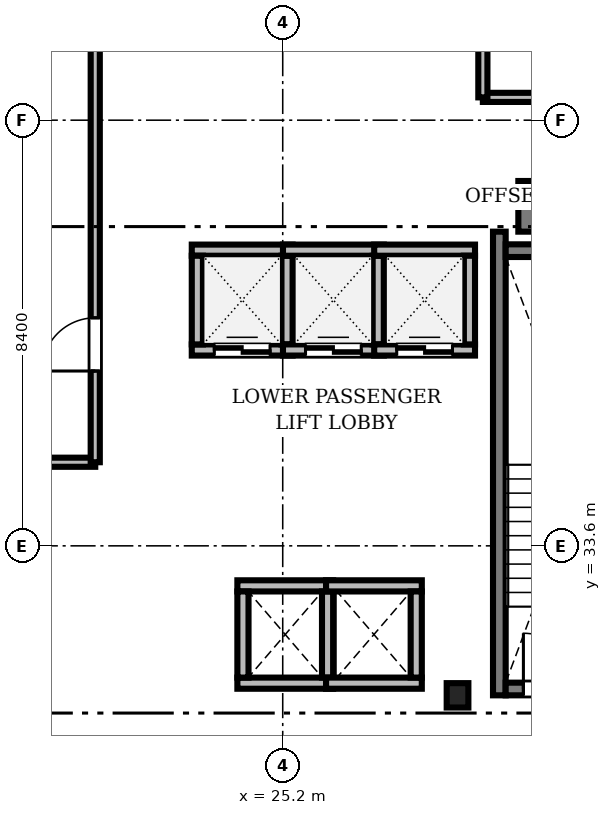
"""IFC4 building model, lengths in metres.
Left out: names, types, materials, properties, quantities, classifications, styles, units other than length and angle.
Written with IfcOpenShell. Run it as: python <this file> out.ifc"""

import sys

from ifc_helpers import new_model, si_unit, direction, frame, frame_2d, origin, origin_2d, place, context, subcontext, project, spatial, rectangle, i_section, extrude, source, transform, mapped, element, fill, save


model = new_model("IFC4")
c1 = context("Model", 3, precision=1e-05, world=origin(), true_north=direction((0.0, 1.0)))
c2 = subcontext(c1, "Body", "Model", "MODEL_VIEW")
j1 = project(units=[si_unit("LENGTHUNIT", "METRE"), si_unit("PLANEANGLEUNIT", "RADIAN")], contexts=[c1])
p1 = place(None, origin())
s1 = spatial("IfcSite", under=j1, at=p1, CompositionType="ELEMENT")
p2 = place(p1, origin())
s2 = spatial("IfcBuilding", under=s1, at=p2, CompositionType="ELEMENT")
p3 = place(p2, frame((0.0, 0.0, 42.2)))
s3 = spatial("IfcBuildingStorey", under=s2, at=p3, CompositionType="ELEMENT", Elevation=42.2)
m1 = source(origin(), c2, "Body", "SweptSolid", [
    extrude(rectangle(XDim=17.52, YDim=1.0, at=frame_2d((8.76, 0.0))), origin(), (0.0, 0.0, 1.0), 3.41),
])
p4 = place(p3, frame((29.85, 40.3, 0.0), z_axis=(0.0, 0.0, 1.0), x_axis=(1.0, 0.0, 0.0)))
e1 = element("IfcWall", 1, at=p4, inside=s3, PredefinedType="SHEAR", context=c2, shape_type="MappedRepresentation", body=[
    mapped(m1, transform((0.0, 0.0, 0.0), scale=1.0)),
])
m2 = source(origin(), c2, "Body", "SweptSolid", [
    extrude(i_section(OverallWidth=0.428, OverallDepth=0.481, WebThickness=0.04, FlangeThickness=0.063, FilletRadius=0.015, at=origin_2d()), origin(), (0.0, 0.0, 1.0), 3.41),
])
p5 = place(p3, frame((28.65, 30.65, 0.0), z_axis=(0.0, 0.0, 1.0), x_axis=(1.0, 0.0, 0.0)))
e2 = element("IfcColumn", 2, at=p5, inside=s3, PredefinedType="COLUMN", context=c2, shape_type="MappedRepresentation", body=[
    mapped(m2, transform((0.0, 0.0, 0.0), scale=1.0)),
])
m3 = source(origin(), c2, "Body", "SweptSolid", [
    extrude(rectangle(XDim=9.15, YDim=0.25, at=frame_2d((4.575, 0.0))), origin(), (0.0, 0.0, 1.0), 3.45),
])
p6 = place(p3, frame((29.475, 30.65, 0.0), z_axis=(0.0, 0.0, 1.0), x_axis=(0.0, 1.0, 0.0)))
e3 = element("IfcWall", 3, at=p6, inside=s3, PredefinedType="SOLIDWALL", context=c2, shape_type="MappedRepresentation", body=[
    mapped(m3, transform((0.0, 0.0, 0.0), scale=1.0)),
])
m4 = source(origin(), c2, "Body", "SweptSolid", [
    extrude(rectangle(XDim=3.15, YDim=0.25, at=frame_2d((1.575, 0.0))), origin(), (0.0, 0.0, 1.0), 3.45),
])
p7 = place(p3, frame((29.6, 39.425, 0.0), z_axis=(0.0, 0.0, 1.0), x_axis=(1.0, 0.0, 0.0)))
e4 = element("IfcWall", 4, at=p7, inside=s3, PredefinedType="SOLIDWALL", context=c2, shape_type="MappedRepresentation", body=[
    mapped(m4, transform((0.0, 0.0, 0.0), scale=1.0)),
])
p8 = place(p3, frame((29.6, 30.775, 0.0), z_axis=(0.0, 0.0, 1.0), x_axis=(1.0, 0.0, 0.0)))
e5 = element("IfcWall", 5, at=p8, inside=s3, PredefinedType="SOLIDWALL", context=c2, shape_type="MappedRepresentation", body=[
    mapped(m4, transform((0.0, 0.0, 0.0), scale=1.0)),
])
m5 = source(origin(), c2, "Body", "SweptSolid", [
    extrude(rectangle(XDim=1.1, YDim=2.2, at=frame_2d((0.55, 1.1))), frame((0.0, 0.135, 0.0), z_axis=(0.0, -1.0, 0.0), x_axis=(1.0, 0.0, 0.0)), (0.0, 0.0, 1.0), 0.27),
])
p9 = place(p8, frame((0.35, 0.0, 0.0)))
e6 = element("IfcOpeningElement", 6, at=p9, cuts=e5, PredefinedType="OPENING", context=c2, shape_type="MappedRepresentation", body=[
    mapped(m5, transform((0.0, 0.0, 0.0), scale=1.0)),
])
m6 = source(origin(), c2, "Body", "SweptSolid", [
    extrude(rectangle(XDim=1.99, YDim=0.22, at=frame_2d((0.995, 0.0))), origin(), (0.0, 0.0, 1.0), 3.41),
])
p10 = place(p3, frame((23.405, 37.465, 0.0), z_axis=(0.0, 0.0, 1.0), x_axis=(1.0, 0.0, 0.0)))
e7 = element("IfcWall", 7, at=p10, inside=s3, PredefinedType="SOLIDWALL", context=c2, shape_type="MappedRepresentation", body=[
    mapped(m6, transform((0.0, 0.0, 0.0), scale=1.0)),
])
m7 = source(origin(), c2, "Body", "SweptSolid", [
    extrude(rectangle(XDim=1.1, YDim=2.2, at=frame_2d((0.55, 1.1))), frame((0.0, 0.12, 0.0), z_axis=(0.0, -1.0, 0.0), x_axis=(1.0, 0.0, 0.0)), (0.0, 0.0, 1.0), 0.24),
])
p11 = place(p10, frame((0.445, 0.0, 0.0)))
e8 = element("IfcOpeningElement", 8, at=p11, cuts=e7, PredefinedType="OPENING", context=c2, shape_type="MappedRepresentation", body=[
    mapped(m7, transform((0.0, 0.0, 0.0), scale=1.0)),
])
p12 = place(p3, frame((23.405, 39.435, 0.0), z_axis=(0.0, 0.0, 1.0), x_axis=(1.0, 0.0, 0.0)))
e9 = element("IfcWall", 9, at=p12, inside=s3, PredefinedType="SOLIDWALL", context=c2, shape_type="MappedRepresentation", body=[
    mapped(m6, transform((0.0, 0.0, 0.0), scale=1.0)),
])
m8 = source(origin(), c2, "Body", "SweptSolid", [
    extrude(rectangle(XDim=1.75, YDim=0.22, at=frame_2d((0.875, 0.0))), origin(), (0.0, 0.0, 1.0), 3.41),
])
for number, where, z_axis, x_axis in (
    (10, (23.515, 37.575, 0.0), (0.0, 0.0, 1.0), (0.0, 1.0, 0.0)),
    (11, (25.285, 37.575, 0.0), (0.0, 0.0, 1.0), (0.0, 1.0, 0.0)),
):
    element("IfcWall", number, at=place(p3, frame(where, z_axis=z_axis, x_axis=x_axis)), inside=s3, PredefinedType="SOLIDWALL", context=c2, shape_type="MappedRepresentation", body=[
        mapped(m8, transform((0.0, 0.0, 0.0), scale=1.0)),
    ])
p13 = place(p3, frame((25.205, 37.465, 0.0), z_axis=(0.0, 0.0, 1.0), x_axis=(1.0, 0.0, 0.0)))
e12 = element("IfcWall", 12, at=p13, inside=s3, PredefinedType="SOLIDWALL", context=c2, shape_type="MappedRepresentation", body=[
    mapped(m6, transform((0.0, 0.0, 0.0), scale=1.0)),
])
p14 = place(p13, frame((0.445, 0.0, 0.0)))
e13 = element("IfcOpeningElement", 13, at=p14, cuts=e12, PredefinedType="OPENING", context=c2, shape_type="MappedRepresentation", body=[
    mapped(m7, transform((0.0, 0.0, 0.0), scale=1.0)),
])
p15 = place(p3, frame((25.205, 39.435, 0.0), z_axis=(0.0, 0.0, 1.0), x_axis=(1.0, 0.0, 0.0)))
e14 = element("IfcWall", 14, at=p15, inside=s3, PredefinedType="SOLIDWALL", context=c2, shape_type="MappedRepresentation", body=[
    mapped(m6, transform((0.0, 0.0, 0.0), scale=1.0)),
])
p16 = place(p3, frame((27.085, 37.575, 0.0), z_axis=(0.0, 0.0, 1.0), x_axis=(0.0, 1.0, 0.0)))
e15 = element("IfcWall", 15, at=p16, inside=s3, PredefinedType="SOLIDWALL", context=c2, shape_type="MappedRepresentation", body=[
    mapped(m8, transform((0.0, 0.0, 0.0), scale=1.0)),
])
m9 = source(origin(), c2, "Body", "SweptSolid", [
    extrude(rectangle(XDim=1.99, YDim=0.22, at=frame_2d((0.995, 0.0))), origin(), (0.0, 0.0, 1.0), 3.41),
])
p17 = place(p3, frame((27.005, 37.465, 0.0), z_axis=(0.0, 0.0, 1.0), x_axis=(1.0, 0.0, 0.0)))
e16 = element("IfcWall", 16, at=p17, inside=s3, PredefinedType="SOLIDWALL", context=c2, shape_type="MappedRepresentation", body=[
    mapped(m9, transform((0.0, 0.0, 0.0), scale=1.0)),
])
p18 = place(p17, frame((0.445, 0.0, 0.0)))
e17 = element("IfcOpeningElement", 17, at=p18, cuts=e16, PredefinedType="OPENING", context=c2, shape_type="MappedRepresentation", body=[
    mapped(m7, transform((0.0, 0.0, 0.0), scale=1.0)),
])
p19 = place(p3, frame((27.005, 39.435, 0.0), z_axis=(0.0, 0.0, 1.0), x_axis=(1.0, 0.0, 0.0)))
e18 = element("IfcWall", 18, at=p19, inside=s3, PredefinedType="SOLIDWALL", context=c2, shape_type="MappedRepresentation", body=[
    mapped(m9, transform((0.0, 0.0, 0.0), scale=1.0)),
])
p20 = place(p3, frame((28.885, 37.575, 0.0), z_axis=(0.0, 0.0, 1.0), x_axis=(0.0, 1.0, 0.0)))
e19 = element("IfcWall", 19, at=p20, inside=s3, PredefinedType="SOLIDWALL", context=c2, shape_type="MappedRepresentation", body=[
    mapped(m8, transform((0.0, 0.0, 0.0), scale=1.0)),
])
m10 = source(origin(), c2, "Body", "SweptSolid", [
    extrude(rectangle(XDim=1.89, YDim=0.22, at=frame_2d((0.945, 0.0))), origin(), (0.0, 0.0, 1.0), 3.41),
])
for number, where, z_axis, x_axis in (
    (20, (24.305, 30.89, 0.0), (0.0, 0.0, 1.0), (1.0, 0.0, 0.0)),
    (21, (24.305, 32.81, 0.0), (0.0, 0.0, 1.0), (1.0, 0.0, 0.0)),
):
    element("IfcWall", number, at=place(p3, frame(where, z_axis=z_axis, x_axis=x_axis)), inside=s3, PredefinedType="SOLIDWALL", context=c2, shape_type="MappedRepresentation", body=[
        mapped(m10, transform((0.0, 0.0, 0.0), scale=1.0)),
    ])
m11 = source(origin(), c2, "Body", "SweptSolid", [
    extrude(rectangle(XDim=1.7, YDim=0.22, at=frame_2d((0.85, 0.0))), origin(), (0.0, 0.0, 1.0), 3.41),
])
for number, where, z_axis, x_axis in (
    (22, (24.415, 31.0, 0.0), (0.0, 0.0, 1.0), (0.0, 1.0, 0.0)),
    (23, (26.085, 31.0, 0.0), (0.0, 0.0, 1.0), (0.0, 1.0, 0.0)),
):
    element("IfcWall", number, at=place(p3, frame(where, z_axis=z_axis, x_axis=x_axis)), inside=s3, PredefinedType="SOLIDWALL", context=c2, shape_type="MappedRepresentation", body=[
        mapped(m11, transform((0.0, 0.0, 0.0), scale=1.0)),
    ])
for number, where, z_axis, x_axis in (
    (24, (26.055, 30.89, 0.0), (0.0, 0.0, 1.0), (1.0, 0.0, 0.0)),
    (25, (26.055, 32.81, 0.0), (0.0, 0.0, 1.0), (1.0, 0.0, 0.0)),
):
    element("IfcWall", number, at=place(p3, frame(where, z_axis=z_axis, x_axis=x_axis)), inside=s3, PredefinedType="SOLIDWALL", context=c2, shape_type="MappedRepresentation", body=[
        mapped(m10, transform((0.0, 0.0, 0.0), scale=1.0)),
    ])
p21 = place(p3, frame((27.835, 31.0, 0.0), z_axis=(0.0, 0.0, 1.0), x_axis=(0.0, 1.0, 0.0)))
e26 = element("IfcWall", 26, at=p21, inside=s3, PredefinedType="SOLIDWALL", context=c2, shape_type="MappedRepresentation", body=[
    mapped(m11, transform((0.0, 0.0, 0.0), scale=1.0)),
])
m12 = source(origin(), c2, "Body", "SweptSolid", [
    extrude(rectangle(XDim=19.428, YDim=0.18, at=frame_2d((9.714, 0.0))), origin(), (0.0, 0.0, 1.0), 2.652),
])
p22 = place(p3, frame((29.15, 42.45, 0.0), z_axis=(0.0, 0.0, 1.0), x_axis=(1.0, 0.0, 0.0)))
e27 = element("IfcWall", 27, at=p22, inside=s3, PredefinedType="PARTITIONING", context=c2, shape_type="MappedRepresentation", body=[
    mapped(m12, transform((0.0, 0.0, 0.0), scale=1.0)),
])
m13 = source(origin(), c2, "Body", "SweptSolid", [
    extrude(rectangle(XDim=1.05, YDim=2.2, at=frame_2d((0.525, 1.1))), frame((0.0, 0.1, 0.0), z_axis=(0.0, -1.0, 0.0), x_axis=(1.0, 0.0, 0.0)), (0.0, 0.0, 1.0), 0.2),
])
p23 = place(p22, frame((4.5, 0.0, 0.0)))
e28 = element("IfcOpeningElement", 28, at=p23, cuts=e27, PredefinedType="OPENING", context=c2, shape_type="MappedRepresentation", body=[
    mapped(m13, transform((0.0, 0.0, 0.0), scale=1.0)),
])
m14 = source(origin(), c2, "Body", "SweptSolid", [
    extrude(rectangle(XDim=19.078, YDim=0.18, at=frame_2d((9.539, 0.0))), origin(), (0.0, 0.0, 1.0), 2.652),
])
p24 = place(p3, frame((2.422, 35.25, 0.0), z_axis=(0.0, 0.0, 1.0), x_axis=(1.0, 0.0, 0.0)))
e29 = element("IfcWall", 29, at=p24, inside=s3, PredefinedType="PARTITIONING", context=c2, shape_type="MappedRepresentation", body=[
    mapped(m14, transform((0.0, 0.0, 0.0), scale=1.0)),
])
p25 = place(p24, frame((13.129, 0.0, 0.0)))
e30 = element("IfcOpeningElement", 30, at=p25, cuts=e29, PredefinedType="OPENING", context=c2, shape_type="MappedRepresentation", body=[
    mapped(m13, transform((0.0, 0.0, 0.0), scale=1.0)),
])
m15 = source(origin(), c2, "Body", "SweptSolid", [
    extrude(rectangle(XDim=13.028, YDim=0.18, at=frame_2d((6.514, 0.0))), origin(), (0.0, 0.0, 1.0), 2.652),
])
p26 = place(p3, frame((21.5, 35.25, 0.0), z_axis=(0.0, 0.0, 1.0), x_axis=(0.0, 1.0, 0.0)))
e31 = element("IfcWall", 31, at=p26, inside=s3, PredefinedType="PARTITIONING", context=c2, shape_type="MappedRepresentation", body=[
    mapped(m15, transform((0.0, 0.0, 0.0), scale=1.0)),
])
p27 = place(p26, frame((1.8, 0.0, 0.0)))
e32 = element("IfcOpeningElement", 32, at=p27, cuts=e31, PredefinedType="OPENING", context=c2, shape_type="MappedRepresentation", body=[
    mapped(m13, transform((0.0, 0.0, 0.0), scale=1.0)),
])
m16 = source(origin(), c2, "Body", "SweptSolid", [
    extrude(rectangle(XDim=5.828, YDim=0.18, at=frame_2d((2.914, 0.0))), origin(), (0.0, 0.0, 1.0), 2.652),
])
p28 = place(p3, frame((29.15, 42.45, 0.0), z_axis=(0.0, 0.0, 1.0), x_axis=(0.0, 1.0, 0.0)))
e33 = element("IfcWall", 33, at=p28, inside=s3, PredefinedType="PARTITIONING", context=c2, shape_type="MappedRepresentation", body=[
    mapped(m16, transform((0.0, 0.0, 0.0), scale=1.0)),
])
m17 = source(origin(), c2, "Body", "SweptSolid", [
    extrude(rectangle(XDim=1.1, YDim=2.2, at=frame_2d((0.55, 1.1))), frame((0.0, 0.025, 0.0), z_axis=(0.0, -1.0, 0.0), x_axis=(1.0, 0.0, 0.0)), (0.0, 0.0, 1.0), 0.05),
])
p29 = place(p9, origin())
e34 = element("IfcDoor", 34, at=p29, inside=s3, OperationType="SINGLE_SWING_LEFT", PredefinedType="DOOR", context=c2, shape_type="MappedRepresentation", body=[
    mapped(m17, transform((0.0, 0.0, 0.0), scale=1.0)),
])
fill(e6, e34)
p30 = place(p11, origin())
e35 = element("IfcDoor", 35, at=p30, inside=s3, OperationType="DOUBLE_DOOR_SLIDING", PredefinedType="DOOR", context=c2, shape_type="MappedRepresentation", body=[
    mapped(m17, transform((0.0, 0.0, 0.0), scale=1.0)),
])
fill(e8, e35)
p31 = place(p14, origin())
e36 = element("IfcDoor", 36, at=p31, inside=s3, OperationType="DOUBLE_DOOR_SLIDING", PredefinedType="DOOR", context=c2, shape_type="MappedRepresentation", body=[
    mapped(m17, transform((0.0, 0.0, 0.0), scale=1.0)),
])
fill(e13, e36)
p32 = place(p18, origin())
e37 = element("IfcDoor", 37, at=p32, inside=s3, OperationType="DOUBLE_DOOR_SLIDING", PredefinedType="DOOR", context=c2, shape_type="MappedRepresentation", body=[
    mapped(m17, transform((0.0, 0.0, 0.0), scale=1.0)),
])
fill(e17, e37)
m18 = source(origin(), c2, "Body", "SweptSolid", [
    extrude(rectangle(XDim=1.05, YDim=2.2, at=frame_2d((0.525, 1.1))), frame((0.0, 0.025, 0.0), z_axis=(0.0, -1.0, 0.0), x_axis=(1.0, 0.0, 0.0)), (0.0, 0.0, 1.0), 0.05),
])
p33 = place(p27, origin())
e38 = element("IfcDoor", 38, at=p33, inside=s3, OperationType="SINGLE_SWING_LEFT", PredefinedType="DOOR", context=c2, shape_type="MappedRepresentation", body=[
    mapped(m18, transform((0.0, 0.0, 0.0), scale=1.0)),
])
fill(e32, e38)
save(model, sys.argv[1])
